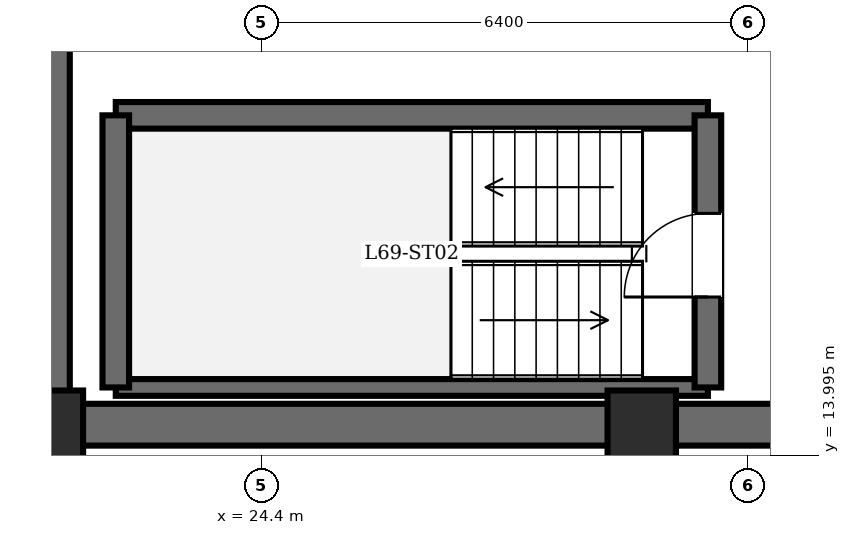
"""IFC4 building model, lengths in metres.
Left out: names, types, materials, properties, quantities, classifications, styles, units other than length and angle.
Written with IfcOpenShell. Run it as: python <this file> out.ifc"""

import sys

from ifc_helpers import new_model, si_unit, direction, frame, frame_2d, origin, origin_2d, place, context, subcontext, project, spatial, rectangle, extrude, element, fill, save


model = new_model("IFC4")
c1 = context("Model", 3, precision=1e-05, world=origin(), true_north=direction((0.0, 1.0)))
c2 = subcontext(c1, "Body", "Model", "MODEL_VIEW")
j1 = project(units=[si_unit("LENGTHUNIT", "METRE"), si_unit("PLANEANGLEUNIT", "RADIAN")], contexts=[c1])
p1 = place(None, origin())
s1 = spatial("IfcSite", under=j1, at=p1, CompositionType="ELEMENT")
p2 = place(p1, origin())
s2 = spatial("IfcBuilding", under=s1, at=p2, CompositionType="ELEMENT")
p3 = place(p2, frame((0.0, 0.0, 266.1)))
s3 = spatial("IfcBuildingStorey", under=s2, at=p3, CompositionType="ELEMENT", Elevation=266.1)
for number, where, z_axis, x_axis in (
    (1, (21.6, 14.4, 0.0), (0.0, 0.0, 1.0), (1.0, 0.0, 0.0)),
    (2, (29.4, 14.4, 0.0), (0.0, 0.0, 1.0), (1.0, 0.0, 0.0)),
):
    element("IfcColumn", number, at=place(p3, frame(where, z_axis=z_axis, x_axis=x_axis)), inside=s3, PredefinedType="COLUMN", context=c2, shape_type="SweptSolid", body=[
        extrude(rectangle(XDim=0.9, YDim=0.9, at=origin_2d()), origin(), (0.0, 0.0, 1.0), 3.65),
    ])
p4 = place(p3, frame((21.6, 14.4, 0.0), z_axis=(0.0, 0.0, 1.0), x_axis=(0.0, 1.0, 0.0)))
e3 = element("IfcWall", 3, at=p4, inside=s3, PredefinedType="SHEAR", context=c2, shape_type="SweptSolid", body=[
    extrude(rectangle(XDim=19.2, YDim=0.55, at=frame_2d((9.6, 0.0))), origin(), (0.0, 0.0, 1.0), 3.45),
])
p5 = place(p3, frame((37.2, 14.4, 0.0), z_axis=(0.0, 0.0, 1.0), x_axis=(-1.0, 0.0, 0.0)))
e4 = element("IfcWall", 4, at=p5, inside=s3, PredefinedType="SHEAR", context=c2, shape_type="SweptSolid", body=[
    extrude(rectangle(XDim=15.6, YDim=0.55, at=frame_2d((7.8, 0.0))), origin(), (0.0, 0.0, 1.0), 3.45),
])
p6 = place(p3, frame((22.48, 18.47, 0.0), z_axis=(0.0, 0.0, 1.0), x_axis=(1.0, 0.0, 0.0)))
e5 = element("IfcWall", 5, at=p6, inside=s3, PredefinedType="SOLIDWALL", context=c2, shape_type="SweptSolid", body=[
    extrude(rectangle(XDim=7.79, YDim=0.35, at=frame_2d((3.895, 0.0))), origin(), (0.0, 0.0, 1.0), 3.45),
])
p7 = place(p3, frame((22.48, 14.89, 0.0), z_axis=(0.0, 0.0, 1.0), x_axis=(1.0, 0.0, 0.0)))
e6 = element("IfcWall", 6, at=p7, inside=s3, PredefinedType="PARTITIONING", context=c2, shape_type="SweptSolid", body=[
    extrude(rectangle(XDim=7.79, YDim=0.22, at=frame_2d((3.895, 0.0))), origin(), (0.0, 0.0, 1.0), 3.45),
])
p8 = place(p3, frame((22.48, 14.89, 0.0), z_axis=(0.0, 0.0, 1.0), x_axis=(0.0, 1.0, 0.0)))
e7 = element("IfcWall", 7, at=p8, inside=s3, PredefinedType="SOLIDWALL", context=c2, shape_type="SweptSolid", body=[
    extrude(rectangle(XDim=3.58, YDim=0.35, at=frame_2d((1.79, 0.0))), origin(), (0.0, 0.0, 1.0), 3.45),
])
p9 = place(p3, frame((30.27, 14.89, 0.0), z_axis=(0.0, 0.0, 1.0), x_axis=(0.0, 1.0, 0.0)))
e8 = element("IfcWall", 8, at=p9, inside=s3, PredefinedType="SOLIDWALL", context=c2, shape_type="SweptSolid", body=[
    extrude(rectangle(XDim=3.58, YDim=0.35, at=frame_2d((1.79, 0.0))), origin(), (0.0, 0.0, 1.0), 3.45),
])
p10 = place(p9, frame((1.19, 0.0, 0.0)))
e9 = element("IfcOpeningElement", 9, at=p10, cuts=e8, PredefinedType="OPENING", context=c2, shape_type="SweptSolid", body=[
    extrude(rectangle(XDim=1.1, YDim=2.15, at=frame_2d((0.55, 1.075))), frame((0.0, 0.185, 0.0), z_axis=(0.0, -1.0, 0.0), x_axis=(1.0, 0.0, 0.0)), (0.0, 0.0, 1.0), 0.37),
])
p11 = place(p10, origin())
e10 = element("IfcDoor", 10, at=p11, inside=s3, OperationType="SINGLE_SWING_LEFT", PredefinedType="DOOR", context=c2, shape_type="SweptSolid", body=[
    extrude(rectangle(XDim=1.1, YDim=2.15, at=frame_2d((0.55, 1.075))), frame((0.0, 0.025, 0.0), z_axis=(0.0, -1.0, 0.0), x_axis=(1.0, 0.0, 0.0)), (0.0, 0.0, 1.0), 0.05),
])
fill(e9, e10)
save(model, sys.argv[1])
